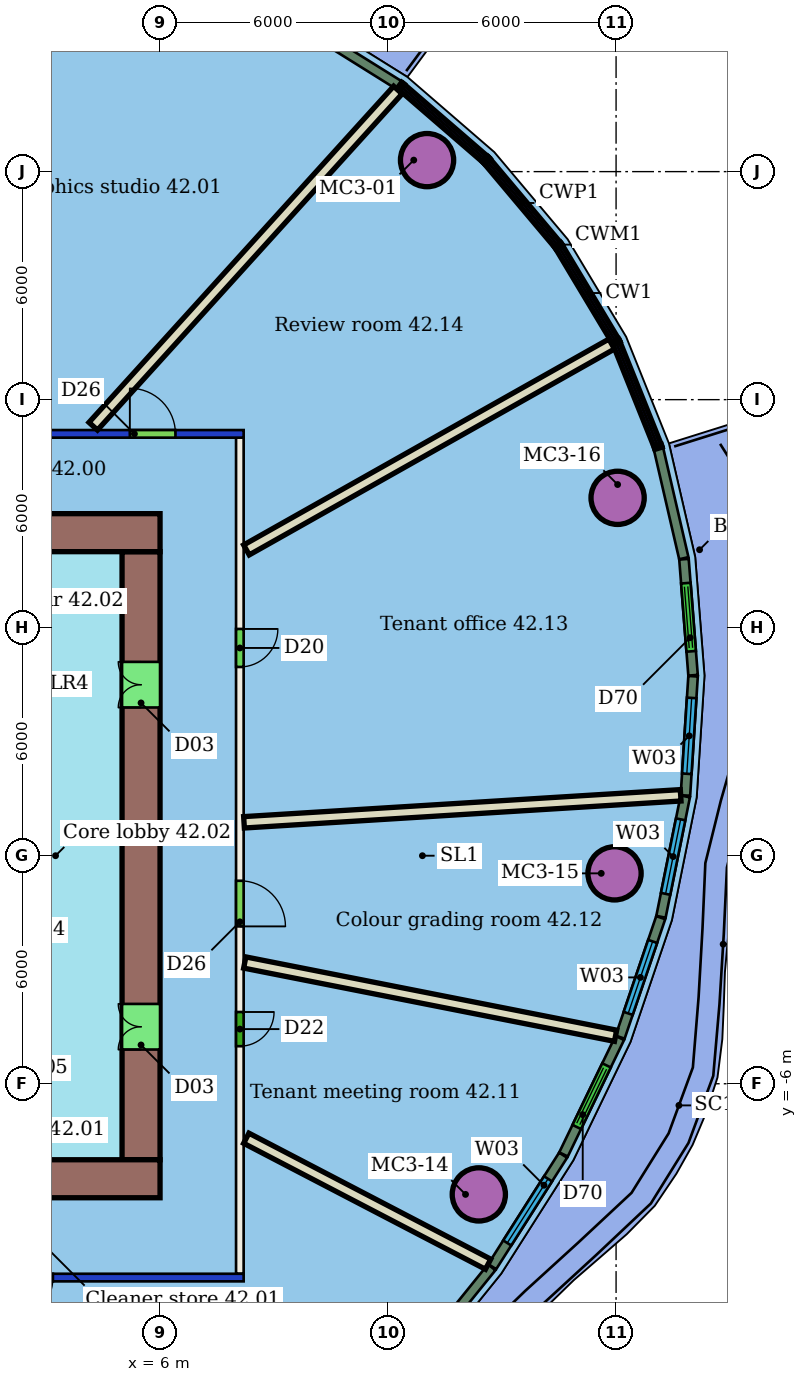
"""IFC4 building model, lengths in metres.
Left out: names, types, materials, properties, quantities, classifications, styles, units other than length and angle.
Written with IfcOpenShell. Run it as: python <this file> out.ifc"""

import sys

from ifc_helpers import new_model, si_unit, direction, frame, frame_2d, origin, origin_2d, place, context, subcontext, project, spatial, rectangle, hollow_circle, extrude, element, fill, save


model = new_model("IFC4")
c1 = context("Model", 3, precision=1e-05, world=origin(), true_north=direction((0.0, 1.0)))
c2 = subcontext(c1, "Body", "Model", "MODEL_VIEW")
j1 = project(units=[si_unit("LENGTHUNIT", "METRE"), si_unit("PLANEANGLEUNIT", "RADIAN")], contexts=[c1])
p1 = place(None, origin())
s1 = spatial("IfcSite", under=j1, at=p1, CompositionType="ELEMENT")
p2 = place(p1, origin())
s2 = spatial("IfcBuilding", under=s1, at=p2, CompositionType="ELEMENT")
p3 = place(p2, frame((0.0, 0.0, 175.8)))
s3 = spatial("IfcBuildingStorey", under=s2, at=p3, CompositionType="ELEMENT", Elevation=175.8)
for number, where, z_axis, x_axis in (
    (1, (13.026, 18.303, 0.0), (0.0, 0.0, 1.0), (1.0, 0.0, 0.0)),
    (2, (14.388, -8.912, 0.0), (0.0, 0.0, 1.0), (1.0, 0.0, 0.0)),
    (3, (17.959, -0.464, 0.0), (0.0, 0.0, 1.0), (1.0, 0.0, 0.0)),
    (4, (18.041, 9.417, 0.0), (0.0, 0.0, 1.0), (1.0, 0.0, 0.0)),
):
    element("IfcColumn", number, at=place(p3, frame(where, z_axis=z_axis, x_axis=x_axis)), inside=s3, PredefinedType="COLUMN", context=c2, shape_type="SweptSolid", body=[
        extrude(hollow_circle(Radius=0.7, WallThickness=0.05, at=origin_2d()), origin(), (0.0, 0.0, 1.0), 3.4),
    ])
p4 = place(p3, frame((8.2, -11.1, 0.0), z_axis=(0.0, 0.0, 1.0), x_axis=(-1.0, 0.0, 0.0)))
e5 = element("IfcWall", 5, at=p4, inside=s3, PredefinedType="PARTITIONING", context=c2, shape_type="SweptSolid", body=[
    extrude(rectangle(XDim=28.4, YDim=0.2, at=frame_2d((14.2, 0.0))), origin(), (0.0, 0.0, 1.0), 3.0),
])
p5 = place(p4, frame((22.523, 0.0, 0.0)))
e6 = element("IfcOpeningElement", 6, at=p5, cuts=e5, PredefinedType="OPENING", context=c2, shape_type="SweptSolid", body=[
    extrude(rectangle(XDim=1.8, YDim=2.1, at=frame_2d((0.9, 1.05))), frame((0.0, 0.11, 0.0), z_axis=(0.0, -1.0, 0.0), x_axis=(1.0, 0.0, 0.0)), (0.0, 0.0, 1.0), 0.22),
])
p6 = place(p4, frame((18.485, 0.0, 0.0)))
e7 = element("IfcOpeningElement", 7, at=p6, cuts=e5, PredefinedType="OPENING", context=c2, shape_type="SweptSolid", body=[
    extrude(rectangle(XDim=1.2, YDim=2.1, at=frame_2d((0.6, 1.05))), frame((0.0, 0.11, 0.0), z_axis=(0.0, -1.0, 0.0), x_axis=(1.0, 0.0, 0.0)), (0.0, 0.0, 1.0), 0.22),
])
p7 = place(p4, frame((14.945, 0.0, 0.0)))
e8 = element("IfcOpeningElement", 8, at=p7, cuts=e5, PredefinedType="OPENING", context=c2, shape_type="SweptSolid", body=[
    extrude(rectangle(XDim=1.0, YDim=2.1, at=frame_2d((0.5, 1.05))), frame((0.0, 0.11, 0.0), z_axis=(0.0, -1.0, 0.0), x_axis=(1.0, 0.0, 0.0)), (0.0, 0.0, 1.0), 0.22),
])
p8 = place(p4, frame((9.653, 0.0, 0.0)))
e9 = element("IfcOpeningElement", 9, at=p8, cuts=e5, PredefinedType="OPENING", context=c2, shape_type="SweptSolid", body=[
    extrude(rectangle(XDim=1.2, YDim=2.1, at=frame_2d((0.6, 1.05))), frame((0.0, 0.11, 0.0), z_axis=(0.0, -1.0, 0.0), x_axis=(1.0, 0.0, 0.0)), (0.0, 0.0, 1.0), 0.22),
])
p9 = place(p4, frame((5.019, 0.0, 0.0)))
e10 = element("IfcOpeningElement", 10, at=p9, cuts=e5, PredefinedType="OPENING", context=c2, shape_type="SweptSolid", body=[
    extrude(rectangle(XDim=1.2, YDim=2.1, at=frame_2d((0.6, 1.05))), frame((0.0, 0.11, 0.0), z_axis=(0.0, -1.0, 0.0), x_axis=(1.0, 0.0, 0.0)), (0.0, 0.0, 1.0), 0.22),
])
p10 = place(p3, frame((-20.2, 11.1, 0.0), z_axis=(0.0, 0.0, 1.0), x_axis=(1.0, 0.0, 0.0)))
e11 = element("IfcWall", 11, at=p10, inside=s3, PredefinedType="PARTITIONING", context=c2, shape_type="SweptSolid", body=[
    extrude(rectangle(XDim=28.4, YDim=0.2, at=frame_2d((14.2, 0.0))), origin(), (0.0, 0.0, 1.0), 3.0),
])
p11 = place(p10, frame((19.265, 0.0, 0.0)))
e12 = element("IfcOpeningElement", 12, at=p11, cuts=e11, PredefinedType="OPENING", context=c2, shape_type="SweptSolid", body=[
    extrude(rectangle(XDim=1.1, YDim=2.1, at=frame_2d((0.55, 1.05))), frame((0.0, 0.11, 0.0), z_axis=(0.0, -1.0, 0.0), x_axis=(1.0, 0.0, 0.0)), (0.0, 0.0, 1.0), 0.22),
])
p12 = place(p10, frame((10.901, 0.0, 0.0)))
e13 = element("IfcOpeningElement", 13, at=p12, cuts=e11, PredefinedType="OPENING", context=c2, shape_type="SweptSolid", body=[
    extrude(rectangle(XDim=1.8, YDim=2.1, at=frame_2d((0.9, 1.05))), frame((0.0, 0.11, 0.0), z_axis=(0.0, -1.0, 0.0), x_axis=(1.0, 0.0, 0.0)), (0.0, 0.0, 1.0), 0.22),
])
p13 = place(p10, frame((4.839, 0.0, 0.0)))
e14 = element("IfcOpeningElement", 14, at=p13, cuts=e11, PredefinedType="OPENING", context=c2, shape_type="SweptSolid", body=[
    extrude(rectangle(XDim=1.5, YDim=2.1, at=frame_2d((0.75, 1.05))), frame((0.0, 0.11, 0.0), z_axis=(0.0, -1.0, 0.0), x_axis=(1.0, 0.0, 0.0)), (0.0, 0.0, 1.0), 0.22),
])
p14 = place(p10, frame((25.405, 0.0, 0.0)))
e15 = element("IfcOpeningElement", 15, at=p14, cuts=e11, PredefinedType="OPENING", context=c2, shape_type="SweptSolid", body=[
    extrude(rectangle(XDim=1.2, YDim=2.1, at=frame_2d((0.6, 1.05))), frame((0.0, 0.11, 0.0), z_axis=(0.0, -1.0, 0.0), x_axis=(1.0, 0.0, 0.0)), (0.0, 0.0, 1.0), 0.22),
])
p15 = place(p3, frame((8.1, 11.0, 0.0), z_axis=(0.0, 0.0, 1.0), x_axis=(0.0, -1.0, 0.0)))
e16 = element("IfcWall", 16, at=p15, inside=s3, PredefinedType="PARTITIONING", context=c2, shape_type="SweptSolid", body=[
    extrude(rectangle(XDim=22.0, YDim=0.2, at=frame_2d((11.0, 0.0))), origin(), (0.0, 0.0, 1.0), 3.4),
])
p16 = place(p15, frame((15.112, 0.0, 0.0)))
e17 = element("IfcOpeningElement", 17, at=p16, cuts=e16, PredefinedType="OPENING", context=c2, shape_type="SweptSolid", body=[
    extrude(rectangle(XDim=0.9, YDim=2.1, at=frame_2d((0.45, 1.05))), frame((0.0, 0.11, 0.0), z_axis=(0.0, -1.0, 0.0), x_axis=(1.0, 0.0, 0.0)), (0.0, 0.0, 1.0), 0.22),
])
p17 = place(p15, frame((11.66, 0.0, 0.0)))
e18 = element("IfcOpeningElement", 18, at=p17, cuts=e16, PredefinedType="OPENING", context=c2, shape_type="SweptSolid", body=[
    extrude(rectangle(XDim=1.2, YDim=2.1, at=frame_2d((0.6, 1.05))), frame((0.0, 0.11, 0.0), z_axis=(0.0, -1.0, 0.0), x_axis=(1.0, 0.0, 0.0)), (0.0, 0.0, 1.0), 0.22),
])
p18 = place(p15, frame((5.034, 0.0, 0.0)))
e19 = element("IfcOpeningElement", 19, at=p18, cuts=e16, PredefinedType="OPENING", context=c2, shape_type="SweptSolid", body=[
    extrude(rectangle(XDim=1.0, YDim=2.1, at=frame_2d((0.5, 1.05))), frame((0.0, 0.11, 0.0), z_axis=(0.0, -1.0, 0.0), x_axis=(1.0, 0.0, 0.0)), (0.0, 0.0, 1.0), 0.22),
])
p19 = place(p3, frame((12.258, 20.146, 0.0), z_axis=(0.0, 0.0, 1.0), x_axis=(-0.671538022576, -0.740970096721, 0.0)))
e20 = element("IfcWall", 20, at=p19, inside=s3, PredefinedType="PARTITIONING", context=c2, shape_type="SweptSolid", body=[
    extrude(rectangle(XDim=11.938, YDim=0.3, at=frame_2d((5.969, 0.0))), origin(), (0.0, 0.0, 1.0), 3.4),
])
p20 = place(p3, frame((4.004, -20.209, 0.0), z_axis=(0.0, 0.0, 1.0), x_axis=(-0.443647752569, 0.896201245056, 0.0)))
e21 = element("IfcWall", 21, at=p20, inside=s3, PredefinedType="PARTITIONING", context=c2, shape_type="SweptSolid", body=[
    extrude(rectangle(XDim=9.979, YDim=0.3, at=frame_2d((4.989, 0.0))), origin(), (0.0, 0.0, 1.0), 3.4),
])
p21 = place(p3, frame((14.632, -10.749, 0.0), z_axis=(0.0, 0.0, 1.0), x_axis=(-0.886864995103, 0.462028657618, 0.0)))
e22 = element("IfcWall", 22, at=p21, inside=s3, PredefinedType="PARTITIONING", context=c2, shape_type="SweptSolid", body=[
    extrude(rectangle(XDim=7.175, YDim=0.3, at=frame_2d((3.587, 0.0))), origin(), (0.0, 0.0, 1.0), 3.4),
])
p22 = place(p3, frame((17.987, -4.737, 0.0), z_axis=(0.0, 0.0, 1.0), x_axis=(-0.981048005171, 0.193764835689, 0.0)))
e23 = element("IfcWall", 23, at=p22, inside=s3, PredefinedType="PARTITIONING", context=c2, shape_type="SweptSolid", body=[
    extrude(rectangle(XDim=9.946, YDim=0.3, at=frame_2d((4.973, 0.0))), origin(), (0.0, 0.0, 1.0), 3.4),
])
p23 = place(p3, frame((19.7, 1.589, 0.0), z_axis=(0.0, 0.0, 1.0), x_axis=(-0.998092720138, -0.061732665639, 0.0)))
e24 = element("IfcWall", 24, at=p23, inside=s3, PredefinedType="PARTITIONING", context=c2, shape_type="SweptSolid", body=[
    extrude(rectangle(XDim=11.512, YDim=0.3, at=frame_2d((5.756, 0.0))), origin(), (0.0, 0.0, 1.0), 3.4),
])
p24 = place(p3, frame((17.885, 13.463, 0.0), z_axis=(0.0, 0.0, 1.0), x_axis=(-0.871144981066, -0.491025887265, 0.0)))
e25 = element("IfcWall", 25, at=p24, inside=s3, PredefinedType="PARTITIONING", context=c2, shape_type="SweptSolid", body=[
    extrude(rectangle(XDim=11.033, YDim=0.3, at=frame_2d((5.517, 0.0))), origin(), (0.0, 0.0, 1.0), 3.4),
])
p25 = place(p3, frame((12.286, 20.276, 0.0), z_axis=(0.0, 0.0, 1.0), x_axis=(-0.848248973031, 0.529597658371, 0.0)))
e26 = element("IfcWall", 26, at=p25, inside=s3, PredefinedType="SOLIDWALL", context=c2, shape_type="SweptSolid", body=[
    extrude(rectangle(XDim=2.954, YDim=0.25, at=frame_2d((1.477, 0.0))), origin(), (0.0, 0.0, 1.0), 3.05),
])
p26 = place(p3, frame((12.533, -13.545, 0.0), z_axis=(0.0, 0.0, 1.0), x_axis=(0.628441308027, 0.777857006374, 0.0)))
e27 = element("IfcWall", 27, at=p26, inside=s3, PredefinedType="SOLIDWALL", context=c2, shape_type="SweptSolid", body=[
    extrude(rectangle(XDim=3.49, YDim=0.25, at=frame_2d((1.745, 0.0))), origin(), (0.0, 0.0, 1.0), 3.05),
])
p27 = place(p3, frame((14.74, -10.812, 0.0), z_axis=(0.0, 0.0, 1.0), x_axis=(0.53695729442, 0.843609426197, 0.0)))
e28 = element("IfcWall", 28, at=p27, inside=s3, PredefinedType="SOLIDWALL", context=c2, shape_type="SweptSolid", body=[
    extrude(rectangle(XDim=3.476, YDim=0.25, at=frame_2d((1.738, 0.0))), origin(), (0.0, 0.0, 1.0), 3.05),
])
p28 = place(p27, frame((0.738, 0.0, 0.9)))
e29 = element("IfcOpeningElement", 29, at=p28, cuts=e28, PredefinedType="OPENING", context=c2, shape_type="SweptSolid", body=[
    extrude(rectangle(XDim=2.0, YDim=2.1, at=frame_2d((1.0, 1.05))), frame((0.0, 0.135, 0.0), z_axis=(0.0, -1.0, 0.0), x_axis=(1.0, 0.0, 0.0)), (0.0, 0.0, 1.0), 0.27),
])
p29 = place(p3, frame((16.617, -7.86, 0.0), z_axis=(0.0, 0.0, 1.0), x_axis=(0.434919571845, 0.900469303211, 0.0)))
e30 = element("IfcWall", 30, at=p29, inside=s3, PredefinedType="SOLIDWALL", context=c2, shape_type="SweptSolid", body=[
    extrude(rectangle(XDim=3.404, YDim=0.25, at=frame_2d((1.702, 0.0))), origin(), (0.0, 0.0, 1.0), 3.05),
])
p30 = place(p29, frame((0.802, 0.0, 0.0)))
e31 = element("IfcOpeningElement", 31, at=p30, cuts=e30, PredefinedType="OPENING", context=c2, shape_type="SweptSolid", body=[
    extrude(rectangle(XDim=1.8, YDim=2.4, at=frame_2d((0.9, 1.2))), frame((0.0, 0.135, 0.0), z_axis=(0.0, -1.0, 0.0), x_axis=(1.0, 0.0, 0.0)), (0.0, 0.0, 1.0), 0.27),
])
p31 = place(p3, frame((18.106, -4.774, 0.0), z_axis=(0.0, 0.0, 1.0), x_axis=(0.321869774717, 0.946783950077, 0.0)))
e32 = element("IfcWall", 32, at=p31, inside=s3, PredefinedType="SOLIDWALL", context=c2, shape_type="SweptSolid", body=[
    extrude(rectangle(XDim=3.32, YDim=0.25, at=frame_2d((1.66, 0.0))), origin(), (0.0, 0.0, 1.0), 3.05),
])
p32 = place(p31, frame((0.66, 0.0, 0.9)))
e33 = element("IfcOpeningElement", 33, at=p32, cuts=e32, PredefinedType="OPENING", context=c2, shape_type="SweptSolid", body=[
    extrude(rectangle(XDim=2.0, YDim=2.1, at=frame_2d((1.0, 1.05))), frame((0.0, 0.135, 0.0), z_axis=(0.0, -1.0, 0.0), x_axis=(1.0, 0.0, 0.0)), (0.0, 0.0, 1.0), 0.27),
])
p33 = place(p3, frame((19.181, -1.607, 0.0), z_axis=(0.0, 0.0, 1.0), x_axis=(0.198076987467, 0.980186465442, 0.0)))
e34 = element("IfcWall", 34, at=p33, inside=s3, PredefinedType="SOLIDWALL", context=c2, shape_type="SweptSolid", body=[
    extrude(rectangle(XDim=3.232, YDim=0.25, at=frame_2d((1.616, 0.0))), origin(), (0.0, 0.0, 1.0), 3.05),
])
p34 = place(p33, frame((0.616, 0.0, 0.9)))
e35 = element("IfcOpeningElement", 35, at=p34, cuts=e34, PredefinedType="OPENING", context=c2, shape_type="SweptSolid", body=[
    extrude(rectangle(XDim=2.0, YDim=2.1, at=frame_2d((1.0, 1.05))), frame((0.0, 0.135, 0.0), z_axis=(0.0, -1.0, 0.0), x_axis=(1.0, 0.0, 0.0)), (0.0, 0.0, 1.0), 0.27),
])
p35 = place(p3, frame((19.824, 1.585, 0.0), z_axis=(0.0, 0.0, 1.0), x_axis=(0.064065458037, 0.997945698466, 0.0)))
e36 = element("IfcWall", 36, at=p35, inside=s3, PredefinedType="SOLIDWALL", context=c2, shape_type="SweptSolid", body=[
    extrude(rectangle(XDim=3.144, YDim=0.25, at=frame_2d((1.572, 0.0))), origin(), (0.0, 0.0, 1.0), 3.05),
])
p36 = place(p35, frame((0.572, 0.0, 0.9)))
e37 = element("IfcOpeningElement", 37, at=p36, cuts=e36, PredefinedType="OPENING", context=c2, shape_type="SweptSolid", body=[
    extrude(rectangle(XDim=2.0, YDim=2.1, at=frame_2d((1.0, 1.05))), frame((0.0, 0.135, 0.0), z_axis=(0.0, -1.0, 0.0), x_axis=(1.0, 0.0, 0.0)), (0.0, 0.0, 1.0), 0.27),
])
p37 = place(p3, frame((20.026, 4.748, 0.0), z_axis=(0.0, 0.0, 1.0), x_axis=(-0.078116681752, 0.99694422313, 0.0)))
e38 = element("IfcWall", 38, at=p37, inside=s3, PredefinedType="SOLIDWALL", context=c2, shape_type="SweptSolid", body=[
    extrude(rectangle(XDim=3.063, YDim=0.25, at=frame_2d((1.531, 0.0))), origin(), (0.0, 0.0, 1.0), 3.05),
])
p38 = place(p37, frame((0.631, 0.0, 0.0)))
e39 = element("IfcOpeningElement", 39, at=p38, cuts=e38, PredefinedType="OPENING", context=c2, shape_type="SweptSolid", body=[
    extrude(rectangle(XDim=1.8, YDim=2.4, at=frame_2d((0.9, 1.2))), frame((0.0, 0.135, 0.0), z_axis=(0.0, -1.0, 0.0), x_axis=(1.0, 0.0, 0.0)), (0.0, 0.0, 1.0), 0.27),
])
p39 = place(p3, frame((19.782, 7.828, 0.0), z_axis=(0.0, 0.0, 1.0), x_axis=(-0.22524585032, 0.974301958796, 0.0)))
e40 = element("IfcWall", 40, at=p39, inside=s3, PredefinedType="SOLIDWALL", context=c2, shape_type="SweptSolid", body=[
    extrude(rectangle(XDim=2.954, YDim=0.25, at=frame_2d((1.477, 0.0))), origin(), (0.0, 0.0, 1.0), 3.05),
])
p40 = place(p3, frame((6.0, 8.5, 0.0), z_axis=(0.0, 0.0, 1.0), x_axis=(-1.0, 0.0, 0.0)))
e41 = element("IfcWall", 41, at=p40, inside=s3, PredefinedType="SHEAR", context=c2, shape_type="SweptSolid", body=[
    extrude(rectangle(XDim=12.0, YDim=1.0, at=frame_2d((6.0, 0.0))), origin(), (0.0, 0.0, 1.0), 3.3),
])
p41 = place(p40, frame((5.6, 0.0, 0.0)))
e42 = element("IfcOpeningElement", 42, at=p41, cuts=e41, PredefinedType="OPENING", context=c2, shape_type="SweptSolid", body=[
    extrude(rectangle(XDim=1.2, YDim=2.1, at=frame_2d((0.6, 1.05))), frame((0.0, 0.51, 0.0), z_axis=(0.0, -1.0, 0.0), x_axis=(1.0, 0.0, 0.0)), (0.0, 0.0, 1.0), 1.02),
])
p42 = place(p3, frame((-18.0, -8.5, 0.0), z_axis=(0.0, 0.0, 1.0), x_axis=(1.0, 0.0, 0.0)))
e43 = element("IfcWall", 43, at=p42, inside=s3, PredefinedType="SHEAR", context=c2, shape_type="SweptSolid", body=[
    extrude(rectangle(XDim=24.0, YDim=1.0, at=frame_2d((12.0, 0.0))), origin(), (0.0, 0.0, 1.0), 3.3),
])
p43 = place(p42, frame((6.0, 0.0, 0.0)))
e44 = element("IfcOpeningElement", 44, at=p43, cuts=e43, PredefinedType="OPENING", context=c2, shape_type="SweptSolid", body=[
    extrude(rectangle(XDim=1.2, YDim=2.1, at=frame_2d((0.6, 1.05))), frame((0.0, 0.51, 0.0), z_axis=(0.0, -1.0, 0.0), x_axis=(1.0, 0.0, 0.0)), (0.0, 0.0, 1.0), 1.02),
])
p44 = place(p3, frame((5.5, -8.0, 0.0), z_axis=(0.0, 0.0, 1.0), x_axis=(0.0, 1.0, 0.0)))
e45 = element("IfcWall", 45, at=p44, inside=s3, PredefinedType="SHEAR", context=c2, shape_type="SweptSolid", body=[
    extrude(rectangle(XDim=16.0, YDim=1.0, at=frame_2d((8.0, 0.0))), origin(), (0.0, 0.0, 1.0), 3.3),
])
p45 = place(p44, frame((2.9, 0.0, 0.0)))
e46 = element("IfcOpeningElement", 46, at=p45, cuts=e45, PredefinedType="OPENING", context=c2, shape_type="SweptSolid", body=[
    extrude(rectangle(XDim=1.2, YDim=2.1, at=frame_2d((0.6, 1.05))), frame((0.0, 0.51, 0.0), z_axis=(0.0, -1.0, 0.0), x_axis=(1.0, 0.0, 0.0)), (0.0, 0.0, 1.0), 1.02),
])
p46 = place(p44, frame((11.9, 0.0, 0.0)))
e47 = element("IfcOpeningElement", 47, at=p46, cuts=e45, PredefinedType="OPENING", context=c2, shape_type="SweptSolid", body=[
    extrude(rectangle(XDim=1.2, YDim=2.1, at=frame_2d((0.6, 1.05))), frame((0.0, 0.51, 0.0), z_axis=(0.0, -1.0, 0.0), x_axis=(1.0, 0.0, 0.0)), (0.0, 0.0, 1.0), 1.02),
])
p47 = place(p9, origin())
e48 = element("IfcDoor", 48, at=p47, inside=s3, OperationType="SINGLE_SWING_RIGHT", PredefinedType="DOOR", context=c2, shape_type="SweptSolid", body=[
    extrude(rectangle(XDim=1.2, YDim=2.1, at=frame_2d((0.6, 1.05))), frame((0.0, 0.025, 0.0), z_axis=(0.0, -1.0, 0.0), x_axis=(1.0, 0.0, 0.0)), (0.0, 0.0, 1.0), 0.05),
])
fill(e10, e48)
p48 = place(p16, origin())
e49 = element("IfcDoor", 49, at=p48, inside=s3, OperationType="SINGLE_SWING_LEFT", PredefinedType="DOOR", context=c2, shape_type="SweptSolid", body=[
    extrude(rectangle(XDim=0.9, YDim=2.1, at=frame_2d((0.45, 1.05))), frame((0.0, 0.025, 0.0), z_axis=(0.0, -1.0, 0.0), x_axis=(1.0, 0.0, 0.0)), (0.0, 0.0, 1.0), 0.05),
])
fill(e17, e49)
p49 = place(p17, origin())
e50 = element("IfcDoor", 50, at=p49, inside=s3, OperationType="SINGLE_SWING_RIGHT", PredefinedType="DOOR", context=c2, shape_type="SweptSolid", body=[
    extrude(rectangle(XDim=1.2, YDim=2.1, at=frame_2d((0.6, 1.05))), frame((0.0, 0.025, 0.0), z_axis=(0.0, -1.0, 0.0), x_axis=(1.0, 0.0, 0.0)), (0.0, 0.0, 1.0), 0.05),
])
fill(e18, e50)
p50 = place(p18, origin())
e51 = element("IfcDoor", 51, at=p50, inside=s3, OperationType="SINGLE_SWING_LEFT", PredefinedType="DOOR", context=c2, shape_type="SweptSolid", body=[
    extrude(rectangle(XDim=1.0, YDim=2.1, at=frame_2d((0.5, 1.05))), frame((0.0, 0.025, 0.0), z_axis=(0.0, -1.0, 0.0), x_axis=(1.0, 0.0, 0.0)), (0.0, 0.0, 1.0), 0.05),
])
fill(e19, e51)
p51 = place(p14, origin())
e52 = element("IfcDoor", 52, at=p51, inside=s3, OperationType="SINGLE_SWING_LEFT", PredefinedType="DOOR", context=c2, shape_type="SweptSolid", body=[
    extrude(rectangle(XDim=1.2, YDim=2.1, at=frame_2d((0.6, 1.05))), frame((0.0, 0.025, 0.0), z_axis=(0.0, -1.0, 0.0), x_axis=(1.0, 0.0, 0.0)), (0.0, 0.0, 1.0), 0.05),
])
fill(e15, e52)
p52 = place(p28, origin())
e53 = element("IfcWindow", 53, at=p52, inside=s3, PartitioningType="SINGLE_PANEL", PredefinedType="WINDOW", context=c2, shape_type="SweptSolid", body=[
    extrude(rectangle(XDim=2.0, YDim=2.1, at=frame_2d((1.0, 1.05))), frame((0.0, 0.03, 0.0), z_axis=(0.0, -1.0, 0.0), x_axis=(1.0, 0.0, 0.0)), (0.0, 0.0, 1.0), 0.06),
])
fill(e29, e53)
p53 = place(p30, origin())
e54 = element("IfcDoor", 54, at=p53, inside=s3, OperationType="DOUBLE_DOOR_SLIDING", PredefinedType="DOOR", context=c2, shape_type="SweptSolid", body=[
    extrude(rectangle(XDim=1.8, YDim=2.4, at=frame_2d((0.9, 1.2))), frame((0.0, 0.025, 0.0), z_axis=(0.0, -1.0, 0.0), x_axis=(1.0, 0.0, 0.0)), (0.0, 0.0, 1.0), 0.05),
])
fill(e31, e54)
p54 = place(p32, origin())
e55 = element("IfcWindow", 55, at=p54, inside=s3, PartitioningType="SINGLE_PANEL", PredefinedType="WINDOW", context=c2, shape_type="SweptSolid", body=[
    extrude(rectangle(XDim=2.0, YDim=2.1, at=frame_2d((1.0, 1.05))), frame((0.0, 0.03, 0.0), z_axis=(0.0, -1.0, 0.0), x_axis=(1.0, 0.0, 0.0)), (0.0, 0.0, 1.0), 0.06),
])
fill(e33, e55)
p55 = place(p34, origin())
e56 = element("IfcWindow", 56, at=p55, inside=s3, PartitioningType="SINGLE_PANEL", PredefinedType="WINDOW", context=c2, shape_type="SweptSolid", body=[
    extrude(rectangle(XDim=2.0, YDim=2.1, at=frame_2d((1.0, 1.05))), frame((0.0, 0.03, 0.0), z_axis=(0.0, -1.0, 0.0), x_axis=(1.0, 0.0, 0.0)), (0.0, 0.0, 1.0), 0.06),
])
fill(e35, e56)
p56 = place(p36, origin())
e57 = element("IfcWindow", 57, at=p56, inside=s3, PartitioningType="SINGLE_PANEL", PredefinedType="WINDOW", context=c2, shape_type="SweptSolid", body=[
    extrude(rectangle(XDim=2.0, YDim=2.1, at=frame_2d((1.0, 1.05))), frame((0.0, 0.03, 0.0), z_axis=(0.0, -1.0, 0.0), x_axis=(1.0, 0.0, 0.0)), (0.0, 0.0, 1.0), 0.06),
])
fill(e37, e57)
p57 = place(p38, origin())
e58 = element("IfcDoor", 58, at=p57, inside=s3, OperationType="DOUBLE_DOOR_SLIDING", PredefinedType="DOOR", context=c2, shape_type="SweptSolid", body=[
    extrude(rectangle(XDim=1.8, YDim=2.4, at=frame_2d((0.9, 1.2))), frame((0.0, 0.025, 0.0), z_axis=(0.0, -1.0, 0.0), x_axis=(1.0, 0.0, 0.0)), (0.0, 0.0, 1.0), 0.05),
])
fill(e39, e58)
p58 = place(p45, origin())
e59 = element("IfcDoor", 59, at=p58, inside=s3, OperationType="DOUBLE_DOOR_SINGLE_SWING", PredefinedType="NOTDEFINED", context=c2, shape_type="SweptSolid", body=[
    extrude(rectangle(XDim=1.2, YDim=2.1, at=frame_2d((0.6, 1.05))), frame((0.0, 0.025, 0.0), z_axis=(0.0, -1.0, 0.0), x_axis=(1.0, 0.0, 0.0)), (0.0, 0.0, 1.0), 0.05),
])
fill(e46, e59)
p59 = place(p46, origin())
e60 = element("IfcDoor", 60, at=p59, inside=s3, OperationType="DOUBLE_DOOR_SINGLE_SWING", PredefinedType="NOTDEFINED", context=c2, shape_type="SweptSolid", body=[
    extrude(rectangle(XDim=1.2, YDim=2.1, at=frame_2d((0.6, 1.05))), frame((0.0, 0.025, 0.0), z_axis=(0.0, -1.0, 0.0), x_axis=(1.0, 0.0, 0.0)), (0.0, 0.0, 1.0), 0.05),
])
fill(e47, e60)
save(model, sys.argv[1])
